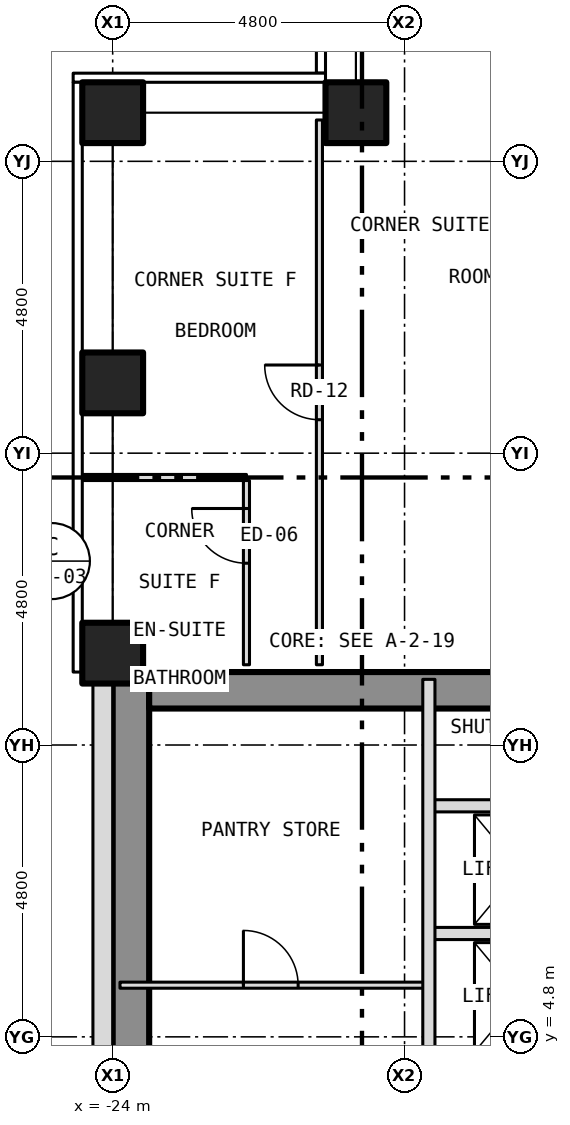
"""IFC4 building model, lengths in metres.
Left out: names, types, materials, properties, quantities, classifications, styles, units other than length and angle.
Written with IfcOpenShell. Run it as: python <this file> out.ifc"""

import sys

from ifc_helpers import new_model, si_unit, direction, frame, frame_2d, origin, origin_2d, place, context, subcontext, project, spatial, rectangle, hollow_rectangle, extrude, element, fill, save


model = new_model("IFC4")
c1 = context("Model", 3, precision=1e-05, world=origin(), true_north=direction((0.0, 1.0)))
c2 = subcontext(c1, "Body", "Model", "MODEL_VIEW")
j1 = project(units=[si_unit("LENGTHUNIT", "METRE"), si_unit("PLANEANGLEUNIT", "RADIAN")], contexts=[c1])
p1 = place(None, origin())
s1 = spatial("IfcSite", under=j1, at=p1, CompositionType="ELEMENT")
p2 = place(p1, origin())
s2 = spatial("IfcBuilding", under=s1, at=p2, CompositionType="ELEMENT")
p3 = place(p2, frame((0.0, 0.0, 70.5)))
s3 = spatial("IfcBuildingStorey", under=s2, at=p3, CompositionType="ELEMENT", Elevation=70.5)
for number, where, z_axis, x_axis in (
    (1, (-24.0, 11.111, -0.15), (0.0, 0.0, 1.0), (1.0, 0.0, 0.0)),
    (2, (-24.0, 15.556, -0.15), (0.0, 0.0, 1.0), (1.0, 0.0, 0.0)),
    (3, (-24.0, 20.0, -0.15), (0.0, 0.0, 1.0), (1.0, 0.0, 0.0)),
    (4, (-20.0, 20.0, -0.15), (0.0, 0.0, 1.0), (1.0, 0.0, 0.0)),
):
    element("IfcColumn", number, at=place(p3, frame(where, z_axis=z_axis, x_axis=x_axis)), inside=s3, PredefinedType="COLUMN", context=c2, shape_type="SweptSolid", body=[
        extrude(hollow_rectangle(XDim=1.0, YDim=1.0, WallThickness=0.06, at=origin_2d()), origin(), (0.0, 0.0, 1.0), 3.5),
    ])
p4 = place(p3, frame((-23.7, -10.8, 0.0), z_axis=(0.0, 0.0, 1.0), x_axis=(0.0, 1.0, 0.0)))
e5 = element("IfcWall", 5, at=p4, inside=s3, PredefinedType="SHEAR", context=c2, shape_type="SweptSolid", body=[
    extrude(rectangle(XDim=21.6, YDim=0.6, at=frame_2d((10.8, 0.0))), origin(), (0.0, 0.0, 1.0), 3.25),
])
p5 = place(p3, frame((-23.4, 10.5, 0.0), z_axis=(0.0, 0.0, 1.0), x_axis=(1.0, 0.0, 0.0)))
e6 = element("IfcWall", 6, at=p5, inside=s3, PredefinedType="SHEAR", context=c2, shape_type="SweptSolid", body=[
    extrude(rectangle(XDim=7.0, YDim=0.6, at=frame_2d((3.5, 0.0))), origin(), (0.0, 0.0, 1.0), 3.25),
])
p6 = place(p3, frame((-24.163, 10.8, 0.0), z_axis=(0.0, 0.0, 1.0), x_axis=(0.0, -1.0, 0.0)))
e7 = element("IfcWall", 7, at=p6, inside=s3, PredefinedType="SOLIDWALL", context=c2, shape_type="SweptSolid", body=[
    extrude(rectangle(XDim=21.6, YDim=0.325, at=frame_2d((10.8, 0.0))), origin(), (0.0, 0.0, 1.0), 3.5),
])
p7 = place(p6, frame((18.05, 0.0, 1.0)))
e8 = element("IfcOpeningElement", 8, at=p7, cuts=e7, PredefinedType="OPENING", context=c2, shape_type="SweptSolid", body=[
    extrude(rectangle(XDim=0.6, YDim=1.5, at=frame_2d((0.3, 0.75))), frame((0.0, 0.175, 0.0), z_axis=(0.0, -1.0, 0.0), x_axis=(1.0, 0.0, 0.0)), (0.0, 0.0, 1.0), 0.349),
])
p8 = place(p3, frame((-23.88, 5.65, 0.0), z_axis=(0.0, 0.0, 1.0), x_axis=(1.0, 0.0, 0.0)))
e9 = element("IfcWall", 9, at=p8, inside=s3, PredefinedType="PARTITIONING", context=c2, shape_type="SweptSolid", body=[
    extrude(rectangle(XDim=5.08, YDim=0.1, at=frame_2d((2.54, 0.0))), origin(), (0.0, 0.0, 1.0), 3.25),
])
p9 = place(p8, frame((2.03, 0.0, 0.0)))
e10 = element("IfcOpeningElement", 10, at=p9, cuts=e9, PredefinedType="OPENING", context=c2, shape_type="SweptSolid", body=[
    extrude(rectangle(XDim=0.9, YDim=2.1, at=frame_2d((0.45, 1.05))), frame((0.0, 0.062, 0.0), z_axis=(0.0, -1.0, 0.0), x_axis=(1.0, 0.0, 0.0)), (0.0, 0.0, 1.0), 0.124),
])
for number, where, z_axis, x_axis in (
    (11, (-18.8, 6.5, 0.0), (0.0, 0.0, 1.0), (1.0, 0.0, 0.0)),
    (12, (-18.8, 8.6, 0.0), (0.0, 0.0, 1.0), (1.0, 0.0, 0.0)),
):
    element("IfcWall", number, at=place(p3, frame(where, z_axis=z_axis, x_axis=x_axis)), inside=s3, PredefinedType="PARTITIONING", context=c2, shape_type="SweptSolid", body=[
        extrude(rectangle(XDim=2.88, YDim=0.2, at=frame_2d((1.44, 0.0))), origin(), (0.0, 0.0, 1.0), 3.25),
    ])
p10 = place(p3, frame((-24.53, 14.0, 0.0), z_axis=(0.0, 0.0, 1.0), x_axis=(1.0, 0.0, 0.0)))
e13 = element("IfcWall", 13, at=p10, inside=s3, PredefinedType="PARTITIONING", context=c2, shape_type="SweptSolid", body=[
    extrude(rectangle(XDim=2.73, YDim=0.1, at=frame_2d((1.365, 0.0))), origin(), (0.0, 0.0, 1.0), 3.35),
])
p11 = place(p3, frame((-21.8, 10.92, 0.0), z_axis=(0.0, 0.0, 1.0), x_axis=(0.0, 1.0, 0.0)))
e14 = element("IfcWall", 14, at=p11, inside=s3, PredefinedType="PARTITIONING", context=c2, shape_type="SweptSolid", body=[
    extrude(rectangle(XDim=3.03, YDim=0.1, at=frame_2d((1.515, 0.0))), origin(), (0.0, 0.0, 1.0), 3.35),
])
p12 = place(p11, frame((1.67, 0.0, 0.0)))
e15 = element("IfcOpeningElement", 15, at=p12, cuts=e14, PredefinedType="OPENING", context=c2, shape_type="SweptSolid", body=[
    extrude(rectangle(XDim=0.9, YDim=2.1, at=frame_2d((0.45, 1.05))), frame((0.0, 0.062, 0.0), z_axis=(0.0, -1.0, 0.0), x_axis=(1.0, 0.0, 0.0)), (0.0, 0.0, 1.0), 0.124),
])
p13 = place(p3, frame((-20.6, 10.92, 0.0), z_axis=(0.0, 0.0, 1.0), x_axis=(0.0, 1.0, 0.0)))
e16 = element("IfcWall", 16, at=p13, inside=s3, PredefinedType="PARTITIONING", context=c2, shape_type="SweptSolid", body=[
    extrude(rectangle(XDim=8.96, YDim=0.1, at=frame_2d((4.48, 0.0))), origin(), (0.0, 0.0, 1.0), 3.35),
])
p14 = place(p13, frame((4.03, 0.0, 0.0)))
e17 = element("IfcOpeningElement", 17, at=p14, cuts=e16, PredefinedType="OPENING", context=c2, shape_type="SweptSolid", body=[
    extrude(rectangle(XDim=0.9, YDim=2.1, at=frame_2d((0.45, 1.05))), frame((0.0, 0.062, 0.0), z_axis=(0.0, -1.0, 0.0), x_axis=(1.0, 0.0, 0.0)), (0.0, 0.0, 1.0), 0.124),
])
p15 = place(p3, frame((-18.8, -1.8, 0.0), z_axis=(0.0, 0.0, 1.0), x_axis=(0.0, 1.0, 0.0)))
e18 = element("IfcWall", 18, at=p15, inside=s3, PredefinedType="PARTITIONING", context=c2, shape_type="SweptSolid", body=[
    extrude(rectangle(XDim=12.48, YDim=0.2, at=frame_2d((6.24, 0.0))), origin(), (0.0, 0.0, 1.0), 3.25),
])
p16 = place(p9, origin())
e19 = element("IfcDoor", 19, at=p16, inside=s3, OperationType="SINGLE_SWING_LEFT", PredefinedType="DOOR", context=c2, shape_type="SweptSolid", body=[
    extrude(rectangle(XDim=0.9, YDim=2.1, at=frame_2d((0.45, 1.05))), frame((0.0, 0.025, 0.0), z_axis=(0.0, -1.0, 0.0), x_axis=(1.0, 0.0, 0.0)), (0.0, 0.0, 1.0), 0.05),
])
fill(e10, e19)
p17 = place(p14, origin())
e20 = element("IfcDoor", 20, at=p17, inside=s3, OperationType="SINGLE_SWING_RIGHT", PredefinedType="DOOR", context=c2, shape_type="SweptSolid", body=[
    extrude(rectangle(XDim=0.9, YDim=2.1, at=frame_2d((0.45, 1.05))), frame((0.0, 0.025, 0.0), z_axis=(0.0, -1.0, 0.0), x_axis=(1.0, 0.0, 0.0)), (0.0, 0.0, 1.0), 0.05),
])
fill(e17, e20)
p18 = place(p12, origin())
e21 = element("IfcDoor", 21, at=p18, inside=s3, OperationType="SINGLE_SWING_RIGHT", PredefinedType="DOOR", context=c2, shape_type="SweptSolid", body=[
    extrude(rectangle(XDim=0.9, YDim=2.1, at=frame_2d((0.45, 1.05))), frame((0.0, 0.025, 0.0), z_axis=(0.0, -1.0, 0.0), x_axis=(1.0, 0.0, 0.0)), (0.0, 0.0, 1.0), 0.05),
])
fill(e15, e21)
save(model, sys.argv[1])
